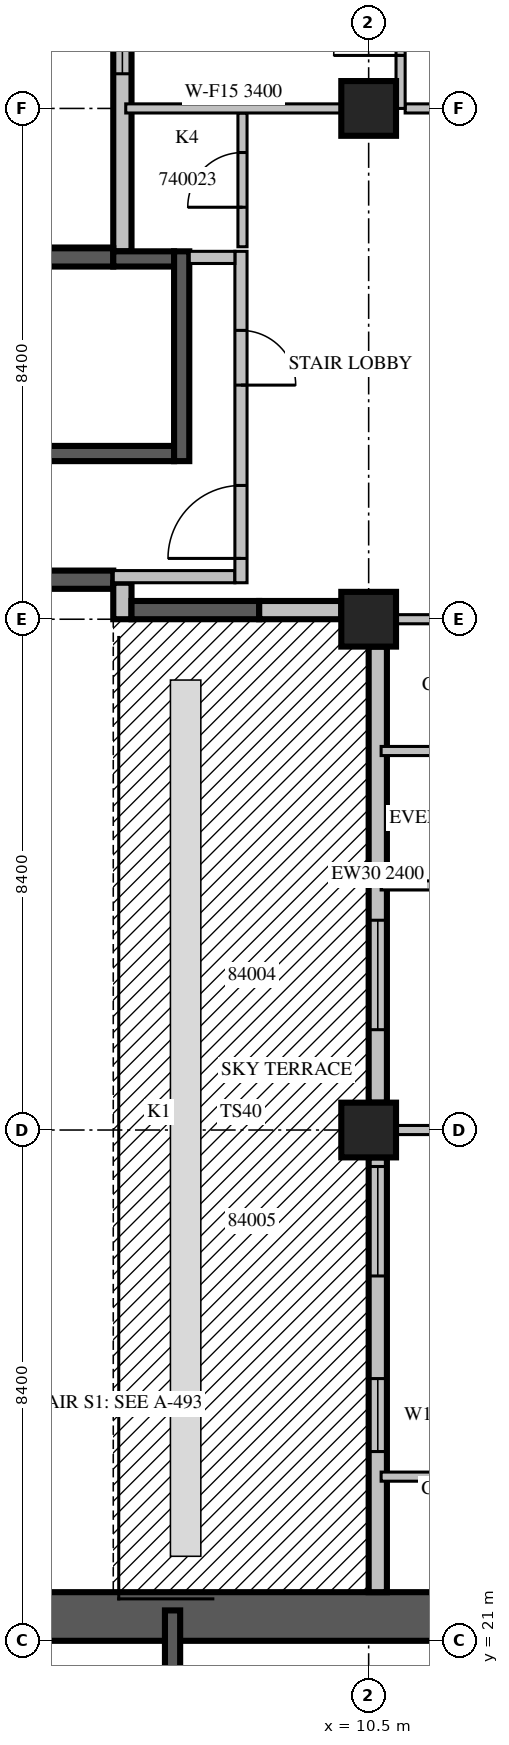
"""IFC4 building model, lengths in metres.
Left out: names, types, materials, properties, quantities, classifications, styles, units other than length and angle.
Written with IfcOpenShell. Run it as: python <this file> out.ifc"""

import sys

from ifc_helpers import new_model, si_unit, direction, frame, frame_2d, origin, origin_2d, place, context, subcontext, project, spatial, rectangle, extrude, source, transform, mapped, element, fill, save


model = new_model("IFC4")
c1 = context("Model", 3, precision=1e-05, world=origin(), true_north=direction((0.0, 1.0)))
c2 = subcontext(c1, "Body", "Model", "MODEL_VIEW")
j1 = project(units=[si_unit("LENGTHUNIT", "METRE"), si_unit("PLANEANGLEUNIT", "RADIAN")], contexts=[c1])
p1 = place(None, origin())
s1 = spatial("IfcSite", under=j1, at=p1, CompositionType="ELEMENT")
p2 = place(p1, origin())
s2 = spatial("IfcBuilding", under=s1, at=p2, CompositionType="ELEMENT")
p3 = place(p2, frame((0.0, 0.0, 185.4)))
s3 = spatial("IfcBuildingStorey", under=s2, at=p3, CompositionType="ELEMENT", Elevation=185.4)
m1 = source(origin(), c2, "Body", "SweptSolid", [
    extrude(rectangle(XDim=0.9, YDim=0.9, at=origin_2d()), origin(), (0.0, 0.0, 1.0), 3.8),
])
for number, where, z_axis, x_axis in (
    (1, (10.5, 29.4, 0.0), (0.0, 0.0, 1.0), (1.0, 0.0, 0.0)),
    (2, (10.5, 37.8, 0.0), (0.0, 0.0, 1.0), (1.0, 0.0, 0.0)),
    (3, (10.5, 46.2, 0.0), (0.0, 0.0, 1.0), (1.0, 0.0, 0.0)),
):
    element("IfcColumn", number, at=place(p3, frame(where, z_axis=z_axis, x_axis=x_axis)), inside=s3, PredefinedType="COLUMN", context=c2, shape_type="MappedRepresentation", body=[
        mapped(m1, transform((0.0, 0.0, 0.0), scale=1.0)),
    ])
m2 = source(origin(), c2, "Body", "SweptSolid", [
    extrude(rectangle(XDim=16.8, YDim=0.8, at=frame_2d((8.4, 0.0))), origin(), (0.0, 0.0, 1.0), 3.8),
])
p4 = place(p3, frame((4.2, 21.4, 0.0), z_axis=(0.0, 0.0, 1.0), x_axis=(1.0, 0.0, 0.0)))
e4 = element("IfcWall", 4, at=p4, inside=s3, PredefinedType="SHEAR", context=c2, shape_type="MappedRepresentation", body=[
    mapped(m2, transform((0.0, 0.0, 0.0), scale=1.0)),
])
m3 = source(origin(), c2, "Body", "SweptSolid", [
    extrude(rectangle(XDim=1.2, YDim=2.1, at=frame_2d((0.6, 1.05))), frame((0.0, 0.41, 0.0), z_axis=(0.0, -1.0, 0.0), x_axis=(1.0, 0.0, 0.0)), (0.0, 0.0, 1.0), 0.82),
])
p5 = place(p4, frame((7.4, 0.0, 0.0)))
e5 = element("IfcOpeningElement", 5, at=p5, cuts=e4, PredefinedType="OPENING", context=c2, shape_type="MappedRepresentation", body=[
    mapped(m3, transform((0.0, 0.0, 0.0), scale=1.0)),
])
m4 = source(origin(), c2, "Body", "SweptSolid", [
    extrude(rectangle(XDim=9.91, YDim=0.3, at=frame_2d((4.955, 0.0))), origin(), (0.0, 0.0, 1.0), 3.4),
])
p6 = place(p3, frame((6.45, 53.76, 0.0), z_axis=(0.0, 0.0, 1.0), x_axis=(0.0, -1.0, 0.0)))
e6 = element("IfcWall", 6, at=p6, inside=s3, PredefinedType="STANDARD", context=c2, shape_type="MappedRepresentation", body=[
    mapped(m4, transform((0.0, 0.0, 0.0), scale=1.0)),
])
m5 = source(origin(), c2, "Body", "SweptSolid", [
    extrude(rectangle(XDim=3.6, YDim=2.3, at=frame_2d((1.8, 1.15))), frame((0.0, 0.16, 0.0), z_axis=(0.0, -1.0, 0.0), x_axis=(1.0, 0.0, 0.0)), (0.0, 0.0, 1.0), 0.32),
])
p7 = place(p6, frame((3.39, 0.0, 0.6)))
e7 = element("IfcOpeningElement", 7, at=p7, cuts=e6, PredefinedType="OPENING", context=c2, shape_type="MappedRepresentation", body=[
    mapped(m5, transform((0.0, 0.0, 0.0), scale=1.0)),
])
m6 = source(origin(), c2, "Body", "SweptSolid", [
    extrude(rectangle(XDim=2.4, YDim=2.3, at=frame_2d((1.2, 1.15))), frame((0.0, 0.16, 0.0), z_axis=(0.0, -1.0, 0.0), x_axis=(1.0, 0.0, 0.0)), (0.0, 0.0, 1.0), 0.32),
])
p8 = place(p6, frame((0.495, 0.0, 0.6)))
e8 = element("IfcOpeningElement", 8, at=p8, cuts=e6, PredefinedType="OPENING", context=c2, shape_type="MappedRepresentation", body=[
    mapped(m6, transform((0.0, 0.0, 0.0), scale=1.0)),
])
m7 = source(origin(), c2, "Body", "SweptSolid", [
    extrude(rectangle(XDim=6.1, YDim=0.3, at=frame_2d((3.05, 0.0))), origin(), (0.0, 0.0, 1.0), 3.4),
])
for number, where, z_axis, x_axis in (
    (9, (6.3, 43.75, 0.0), (0.0, 0.0, 1.0), (-1.0, 0.0, 0.0)),
    (10, (0.2, 38.45, 0.0), (0.0, 0.0, 1.0), (1.0, 0.0, 0.0)),
):
    element("IfcWall", number, at=place(p3, frame(where, z_axis=z_axis, x_axis=x_axis)), inside=s3, PredefinedType="SOLIDWALL", context=c2, shape_type="MappedRepresentation", body=[
        mapped(m7, transform((0.0, 0.0, 0.0), scale=1.0)),
    ])
m8 = source(origin(), c2, "Body", "SweptSolid", [
    extrude(rectangle(XDim=0.6, YDim=0.3, at=frame_2d((0.3, 0.0))), origin(), (0.0, 0.0, 1.0), 3.4),
])
p9 = place(p3, frame((6.45, 38.4, 0.0), z_axis=(0.0, 0.0, 1.0), x_axis=(0.0, -1.0, 0.0)))
e11 = element("IfcWall", 11, at=p9, inside=s3, PredefinedType="STANDARD", context=c2, shape_type="MappedRepresentation", body=[
    mapped(m8, transform((0.0, 0.0, 0.0), scale=1.0)),
])
p10 = place(p3, frame((6.6, 37.95, 0.0), z_axis=(0.0, 0.0, 1.0), x_axis=(1.0, 0.0, 0.0)))
e12 = element("IfcWall", 12, at=p10, inside=s3, PredefinedType="SOLIDWALL", context=c2, shape_type="SweptSolid", body=[
    extrude(rectangle(XDim=2.1, YDim=0.3, at=frame_2d((1.05, 0.0))), origin(), (0.0, 0.0, 1.0), 3.4),
])
p11 = place(p3, frame((8.7, 37.95, 0.0), z_axis=(0.0, 0.0, 1.0), x_axis=(1.0, 0.0, 0.0)))
e13 = element("IfcWall", 13, at=p11, inside=s3, PredefinedType="STANDARD", context=c2, shape_type="SweptSolid", body=[
    extrude(rectangle(XDim=1.35, YDim=0.3, at=frame_2d((0.675, 0.0))), origin(), (0.0, 0.0, 1.0), 3.4),
])
p12 = place(p3, frame((10.65, 37.35, 0.0), z_axis=(0.0, 0.0, 1.0), x_axis=(0.0, -1.0, 0.0)))
e14 = element("IfcWall", 14, at=p12, inside=s3, PredefinedType="STANDARD", context=c2, shape_type="SweptSolid", body=[
    extrude(rectangle(XDim=7.5, YDim=0.3, at=frame_2d((3.75, 0.0))), origin(), (0.0, 0.0, 1.0), 2.4),
])
m9 = source(origin(), c2, "Body", "SweptSolid", [
    extrude(rectangle(XDim=1.8, YDim=2.4, at=frame_2d((0.9, 1.2))), frame((0.0, 0.16, 0.0), z_axis=(0.0, -1.0, 0.0), x_axis=(1.0, 0.0, 0.0)), (0.0, 0.0, 1.0), 0.32),
])
p13 = place(p12, frame((4.5, 0.0, 0.0)))
e15 = element("IfcOpeningElement", 15, at=p13, cuts=e14, PredefinedType="OPENING", context=c2, shape_type="MappedRepresentation", body=[
    mapped(m9, transform((0.0, 0.0, 0.0), scale=1.0)),
])
m10 = source(origin(), c2, "Body", "SweptSolid", [
    extrude(rectangle(XDim=7.15, YDim=0.3, at=frame_2d((3.575, 0.0))), origin(), (0.0, 0.0, 1.0), 3.4),
])
p14 = place(p3, frame((10.65, 28.95, 0.0), z_axis=(0.0, 0.0, 1.0), x_axis=(0.0, -1.0, 0.0)))
e16 = element("IfcWall", 16, at=p14, inside=s3, PredefinedType="STANDARD", context=c2, shape_type="MappedRepresentation", body=[
    mapped(m10, transform((0.0, 0.0, 0.0), scale=1.0)),
])
p15 = place(p14, frame((0.15, 0.0, 0.0)))
e17 = element("IfcOpeningElement", 17, at=p15, cuts=e16, PredefinedType="OPENING", context=c2, shape_type="MappedRepresentation", body=[
    mapped(m9, transform((0.0, 0.0, 0.0), scale=1.0)),
])
m11 = source(origin(), c2, "Body", "SweptSolid", [
    extrude(rectangle(XDim=1.2, YDim=2.3, at=frame_2d((0.6, 1.15))), frame((0.0, 0.16, 0.0), z_axis=(0.0, -1.0, 0.0), x_axis=(1.0, 0.0, 0.0)), (0.0, 0.0, 1.0), 0.32),
])
p16 = place(p14, frame((3.638, 0.0, 0.6)))
e18 = element("IfcOpeningElement", 18, at=p16, cuts=e16, PredefinedType="OPENING", context=c2, shape_type="MappedRepresentation", body=[
    mapped(m11, transform((0.0, 0.0, 0.0), scale=1.0)),
])
m12 = source(origin(), c2, "Body", "SweptSolid", [
    extrude(rectangle(XDim=6.6, YDim=0.25, at=frame_2d((3.3, 0.0))), origin(), (0.0, 0.0, 1.0), 3.4),
])
p17 = place(p3, frame((7.275, 14.9, 0.0), z_axis=(0.0, 0.0, 1.0), x_axis=(0.0, 1.0, 0.0)))
e19 = element("IfcWall", 19, at=p17, inside=s3, PredefinedType="SOLIDWALL", context=c2, shape_type="MappedRepresentation", body=[
    mapped(m12, transform((0.0, 0.0, 0.0), scale=1.0)),
])
m13 = source(origin(), c2, "Body", "SweptSolid", [
    extrude(rectangle(XDim=1.1, YDim=2.1, at=frame_2d((0.55, 1.05))), frame((0.0, 0.135, 0.0), z_axis=(0.0, -1.0, 0.0), x_axis=(1.0, 0.0, 0.0)), (0.0, 0.0, 1.0), 0.27),
])
p18 = place(p17, frame((0.15, 0.0, 0.0)))
e20 = element("IfcOpeningElement", 20, at=p18, cuts=e19, PredefinedType="OPENING", context=c2, shape_type="MappedRepresentation", body=[
    mapped(m13, transform((0.0, 0.0, 0.0), scale=1.0)),
])
m14 = source(origin(), c2, "Body", "SweptSolid", [
    extrude(rectangle(XDim=7.0, YDim=0.25, at=frame_2d((3.5, 0.0))), origin(), (0.0, 0.0, 1.0), 3.4),
])
p19 = place(p3, frame((0.3, 40.525, 0.0), z_axis=(0.0, 0.0, 1.0), x_axis=(1.0, 0.0, 0.0)))
e21 = element("IfcWall", 21, at=p19, inside=s3, PredefinedType="SOLIDWALL", context=c2, shape_type="MappedRepresentation", body=[
    mapped(m14, transform((0.0, 0.0, 0.0), scale=1.0)),
])
p20 = place(p19, frame((0.55, 0.0, 0.0)))
e22 = element("IfcOpeningElement", 22, at=p20, cuts=e21, PredefinedType="OPENING", context=c2, shape_type="MappedRepresentation", body=[
    mapped(m13, transform((0.0, 0.0, 0.0), scale=1.0)),
])
m15 = source(origin(), c2, "Body", "SweptSolid", [
    extrude(rectangle(XDim=1.0, YDim=0.25, at=frame_2d((0.5, 0.0))), origin(), (0.0, 0.0, 1.0), 3.4),
])
p21 = place(p3, frame((6.3, 43.725, 0.0), z_axis=(0.0, 0.0, 1.0), x_axis=(1.0, 0.0, 0.0)))
e23 = element("IfcWall", 23, at=p21, inside=s3, PredefinedType="SOLIDWALL", context=c2, shape_type="MappedRepresentation", body=[
    mapped(m15, transform((0.0, 0.0, 0.0), scale=1.0)),
])
m16 = source(origin(), c2, "Body", "SweptSolid", [
    extrude(rectangle(XDim=3.45, YDim=0.25, at=frame_2d((1.725, 0.0))), origin(), (0.0, 0.0, 1.0), 3.4),
])
p22 = place(p3, frame((7.425, 40.4, 0.0), z_axis=(0.0, 0.0, 1.0), x_axis=(0.0, 1.0, 0.0)))
e24 = element("IfcWall", 24, at=p22, inside=s3, PredefinedType="SOLIDWALL", context=c2, shape_type="MappedRepresentation", body=[
    mapped(m16, transform((0.0, 0.0, 0.0), scale=1.0)),
])
m17 = source(origin(), c2, "Body", "SweptSolid", [
    extrude(rectangle(XDim=2.0, YDim=0.2, at=frame_2d((1.0, 0.0))), origin(), (0.0, 0.0, 1.0), 3.4),
])
p23 = place(p3, frame((6.3, 38.5, 0.0), z_axis=(0.0, 0.0, 1.0), x_axis=(1.0, 0.0, 0.0)))
e25 = element("IfcWall", 25, at=p23, inside=s3, PredefinedType="PARTITIONING", context=c2, shape_type="MappedRepresentation", body=[
    mapped(m17, transform((0.0, 0.0, 0.0), scale=1.0)),
])
m18 = source(origin(), c2, "Body", "SweptSolid", [
    extrude(rectangle(XDim=5.45, YDim=0.2, at=frame_2d((2.725, 0.0))), origin(), (0.0, 0.0, 1.0), 3.4),
])
p24 = place(p3, frame((8.4, 38.4, 0.0), z_axis=(0.0, 0.0, 1.0), x_axis=(0.0, 1.0, 0.0)))
e26 = element("IfcWall", 26, at=p24, inside=s3, PredefinedType="PARTITIONING", context=c2, shape_type="MappedRepresentation", body=[
    mapped(m18, transform((0.0, 0.0, 0.0), scale=1.0)),
])
m19 = source(origin(), c2, "Body", "SweptSolid", [
    extrude(rectangle(XDim=1.2, YDim=2.1, at=frame_2d((0.6, 1.05))), frame((0.0, 0.11, 0.0), z_axis=(0.0, -1.0, 0.0), x_axis=(1.0, 0.0, 0.0)), (0.0, 0.0, 1.0), 0.22),
])
p25 = place(p24, frame((0.4, 0.0, 0.0)))
e27 = element("IfcOpeningElement", 27, at=p25, cuts=e26, PredefinedType="OPENING", context=c2, shape_type="MappedRepresentation", body=[
    mapped(m19, transform((0.0, 0.0, 0.0), scale=1.0)),
])
m20 = source(origin(), c2, "Body", "SweptSolid", [
    extrude(rectangle(XDim=0.9, YDim=2.1, at=frame_2d((0.45, 1.05))), frame((0.0, 0.11, 0.0), z_axis=(0.0, -1.0, 0.0), x_axis=(1.0, 0.0, 0.0)), (0.0, 0.0, 1.0), 0.22),
])
p26 = place(p24, frame((3.25, 0.0, 0.0)))
e28 = element("IfcOpeningElement", 28, at=p26, cuts=e26, PredefinedType="OPENING", context=c2, shape_type="MappedRepresentation", body=[
    mapped(m20, transform((0.0, 0.0, 0.0), scale=1.0)),
])
m21 = source(origin(), c2, "Body", "SweptSolid", [
    extrude(rectangle(XDim=0.75, YDim=0.2, at=frame_2d((0.375, 0.0))), origin(), (0.0, 0.0, 1.0), 3.4),
])
p27 = place(p3, frame((7.55, 43.75, 0.0), z_axis=(0.0, 0.0, 1.0), x_axis=(1.0, 0.0, 0.0)))
e29 = element("IfcWall", 29, at=p27, inside=s3, PredefinedType="PARTITIONING", context=c2, shape_type="MappedRepresentation", body=[
    mapped(m21, transform((0.0, 0.0, 0.0), scale=1.0)),
])
p28 = place(p3, frame((10.705, 23.7, 0.0), z_axis=(0.0, 0.0, 1.0), x_axis=(1.0, 0.0, 0.0)))
e30 = element("IfcWall", 30, at=p28, inside=s3, PredefinedType="PARTITIONING", context=c2, shape_type="SweptSolid", body=[
    extrude(rectangle(XDim=4.295, YDim=0.15, at=frame_2d((2.147, 0.0))), origin(), (0.0, 0.0, 1.0), 3.4),
])
m22 = source(origin(), c2, "Body", "SweptSolid", [
    extrude(rectangle(XDim=0.9, YDim=2.1, at=frame_2d((0.45, 1.05))), frame((0.0, 0.085, 0.0), z_axis=(0.0, -1.0, 0.0), x_axis=(1.0, 0.0, 0.0)), (0.0, 0.0, 1.0), 0.17),
])
p29 = place(p28, frame((2.283, 0.0, 0.0)))
e31 = element("IfcOpeningElement", 31, at=p29, cuts=e30, PredefinedType="OPENING", context=c2, shape_type="MappedRepresentation", body=[
    mapped(m22, transform((0.0, 0.0, 0.0), scale=1.0)),
])
m23 = source(origin(), c2, "Body", "SweptSolid", [
    extrude(rectangle(XDim=4.051, YDim=0.15, at=frame_2d((2.026, 0.0))), origin(), (0.0, 0.0, 1.0), 3.4),
])
p30 = place(p3, frame((15.0, 29.4, 0.0), z_axis=(0.0, 0.0, 1.0), x_axis=(-1.0, 0.0, 0.0)))
e32 = element("IfcWall", 32, at=p30, inside=s3, PredefinedType="PARTITIONING", context=c2, shape_type="MappedRepresentation", body=[
    mapped(m23, transform((0.0, 0.0, 0.0), scale=1.0)),
])
m24 = source(origin(), c2, "Body", "SweptSolid", [
    extrude(rectangle(XDim=2.2, YDim=0.15, at=frame_2d((1.1, 0.0))), origin(), (0.0, 0.0, 1.0), 3.4),
])
p31 = place(p3, frame((8.425, 43.925, 0.0), z_axis=(0.0, 0.0, 1.0), x_axis=(0.0, 1.0, 0.0)))
e33 = element("IfcWall", 33, at=p31, inside=s3, PredefinedType="PARTITIONING", context=c2, shape_type="MappedRepresentation", body=[
    mapped(m24, transform((0.0, 0.0, 0.0), scale=1.0)),
])
p32 = place(p31, frame((0.65, 0.0, 0.0)))
e34 = element("IfcOpeningElement", 34, at=p32, cuts=e33, PredefinedType="OPENING", context=c2, shape_type="MappedRepresentation", body=[
    mapped(m22, transform((0.0, 0.0, 0.0), scale=1.0)),
])
m25 = source(origin(), c2, "Body", "SweptSolid", [
    extrude(rectangle(XDim=4.295, YDim=0.15, at=frame_2d((2.147, 0.0))), origin(), (0.0, 0.0, 1.0), 3.4),
])
p33 = place(p3, frame((15.0, 33.422, 0.0), z_axis=(0.0, 0.0, 1.0), x_axis=(-1.0, 0.0, 0.0)))
e35 = element("IfcWall", 35, at=p33, inside=s3, PredefinedType="PARTITIONING", context=c2, shape_type="MappedRepresentation", body=[
    mapped(m25, transform((0.0, 0.0, 0.0), scale=1.0)),
])
p34 = place(p3, frame((15.0, 35.633, 0.0), z_axis=(0.0, 0.0, 1.0), x_axis=(-1.0, 0.0, 0.0)))
e36 = element("IfcWall", 36, at=p34, inside=s3, PredefinedType="PARTITIONING", context=c2, shape_type="MappedRepresentation", body=[
    mapped(m25, transform((0.0, 0.0, 0.0), scale=1.0)),
])
p35 = place(p34, frame((1.698, 0.0, 0.0)))
e37 = element("IfcOpeningElement", 37, at=p35, cuts=e36, PredefinedType="OPENING", context=c2, shape_type="MappedRepresentation", body=[
    mapped(m22, transform((0.0, 0.0, 0.0), scale=1.0)),
])
p36 = place(p3, frame((15.0, 37.8, 0.0), z_axis=(0.0, 0.0, 1.0), x_axis=(-1.0, 0.0, 0.0)))
e38 = element("IfcWall", 38, at=p36, inside=s3, PredefinedType="PARTITIONING", context=c2, shape_type="MappedRepresentation", body=[
    mapped(m23, transform((0.0, 0.0, 0.0), scale=1.0)),
])
m26 = source(origin(), c2, "Body", "SweptSolid", [
    extrude(rectangle(XDim=3.546, YDim=0.15, at=frame_2d((1.773, 0.0))), origin(), (0.0, 0.0, 1.0), 3.4),
])
p37 = place(p3, frame((10.051, 46.2, 0.0), z_axis=(0.0, 0.0, 1.0), x_axis=(-1.0, 0.0, 0.0)))
e39 = element("IfcWall", 39, at=p37, inside=s3, PredefinedType="PARTITIONING", context=c2, shape_type="MappedRepresentation", body=[
    mapped(m26, transform((0.0, 0.0, 0.0), scale=1.0)),
])
m27 = source(origin(), c2, "Body", "SweptSolid", [
    extrude(rectangle(XDim=3.9, YDim=0.15, at=frame_2d((1.95, 0.0))), origin(), (0.0, 0.0, 1.0), 3.4),
])
p38 = place(p3, frame((15.0, 46.2, 0.0), z_axis=(0.0, 0.0, 1.0), x_axis=(-1.0, 0.0, 0.0)))
e40 = element("IfcWall", 40, at=p38, inside=s3, PredefinedType="PARTITIONING", context=c2, shape_type="MappedRepresentation", body=[
    mapped(m27, transform((0.0, 0.0, 0.0), scale=1.0)),
])
m28 = source(origin(), c2, "Body", "SweptSolid", [
    extrude(rectangle(XDim=7.26, YDim=0.15, at=frame_2d((3.63, 0.0))), origin(), (0.0, 0.0, 1.0), 3.4),
])
p39 = place(p3, frame((11.025, 46.2, 0.0), z_axis=(0.0, 0.0, 1.0), x_axis=(0.0, 1.0, 0.0)))
e41 = element("IfcWall", 41, at=p39, inside=s3, PredefinedType="PARTITIONING", context=c2, shape_type="MappedRepresentation", body=[
    mapped(m28, transform((0.0, 0.0, 0.0), scale=1.0)),
])
m29 = source(origin(), c2, "Body", "SweptSolid", [
    extrude(rectangle(XDim=1.1, YDim=2.1, at=frame_2d((0.55, 1.05))), frame((0.0, 0.085, 0.0), z_axis=(0.0, -1.0, 0.0), x_axis=(1.0, 0.0, 0.0)), (0.0, 0.0, 1.0), 0.17),
])
p40 = place(p39, frame((0.872, 0.0, 0.0)))
e42 = element("IfcOpeningElement", 42, at=p40, cuts=e41, PredefinedType="OPENING", context=c2, shape_type="MappedRepresentation", body=[
    mapped(m29, transform((0.0, 0.0, 0.0), scale=1.0)),
])
p41 = place(p39, frame((2.92, 0.0, 0.0)))
e43 = element("IfcOpeningElement", 43, at=p41, cuts=e41, PredefinedType="OPENING", context=c2, shape_type="MappedRepresentation", body=[
    mapped(m22, transform((0.0, 0.0, 0.0), scale=1.0)),
])
p42 = place(p39, frame((4.478, 0.0, 0.0)))
e44 = element("IfcOpeningElement", 44, at=p42, cuts=e41, PredefinedType="OPENING", context=c2, shape_type="MappedRepresentation", body=[
    mapped(m22, transform((0.0, 0.0, 0.0), scale=1.0)),
])
m30 = source(origin(), c2, "Body", "SweptSolid", [
    extrude(rectangle(XDim=3.6, YDim=2.3, at=frame_2d((1.8, 1.15))), frame((0.0, 0.03, 0.0), z_axis=(0.0, -1.0, 0.0), x_axis=(1.0, 0.0, 0.0)), (0.0, 0.0, 1.0), 0.06),
])
p43 = place(p7, origin())
e45 = element("IfcWindow", 45, at=p43, inside=s3, PartitioningType="SINGLE_PANEL", PredefinedType="WINDOW", context=c2, shape_type="MappedRepresentation", body=[
    mapped(m30, transform((0.0, 0.0, 0.0), scale=1.0)),
])
fill(e7, e45)
m31 = source(origin(), c2, "Body", "SweptSolid", [
    extrude(rectangle(XDim=1.8, YDim=2.4, at=frame_2d((0.9, 1.2))), frame((0.0, 0.025, 0.0), z_axis=(0.0, -1.0, 0.0), x_axis=(1.0, 0.0, 0.0)), (0.0, 0.0, 1.0), 0.05),
])
p44 = place(p13, origin())
e46 = element("IfcDoor", 46, at=p44, inside=s3, OperationType="SLIDING_TO_LEFT", PredefinedType="DOOR", context=c2, shape_type="MappedRepresentation", body=[
    mapped(m31, transform((0.0, 0.0, 0.0), scale=1.0)),
])
fill(e15, e46)
p45 = place(p15, origin())
e47 = element("IfcDoor", 47, at=p45, inside=s3, OperationType="SLIDING_TO_LEFT", PredefinedType="DOOR", context=c2, shape_type="MappedRepresentation", body=[
    mapped(m31, transform((0.0, 0.0, 0.0), scale=1.0)),
])
fill(e17, e47)
m32 = source(origin(), c2, "Body", "SweptSolid", [
    extrude(rectangle(XDim=1.2, YDim=2.3, at=frame_2d((0.6, 1.15))), frame((0.0, 0.03, 0.0), z_axis=(0.0, -1.0, 0.0), x_axis=(1.0, 0.0, 0.0)), (0.0, 0.0, 1.0), 0.06),
])
p46 = place(p16, origin())
e48 = element("IfcWindow", 48, at=p46, inside=s3, PartitioningType="SINGLE_PANEL", PredefinedType="WINDOW", context=c2, shape_type="MappedRepresentation", body=[
    mapped(m32, transform((0.0, 0.0, 0.0), scale=1.0)),
])
fill(e18, e48)
m33 = source(origin(), c2, "Body", "SweptSolid", [
    extrude(rectangle(XDim=1.2, YDim=2.1, at=frame_2d((0.6, 1.05))), frame((0.0, 0.025, 0.0), z_axis=(0.0, -1.0, 0.0), x_axis=(1.0, 0.0, 0.0)), (0.0, 0.0, 1.0), 0.05),
])
p47 = place(p25, origin())
e49 = element("IfcDoor", 49, at=p47, inside=s3, OperationType="SINGLE_SWING_LEFT", PredefinedType="DOOR", context=c2, shape_type="MappedRepresentation", body=[
    mapped(m33, transform((0.0, 0.0, 0.0), scale=1.0)),
])
fill(e27, e49)
m34 = source(origin(), c2, "Body", "SweptSolid", [
    extrude(rectangle(XDim=0.9, YDim=2.1, at=frame_2d((0.45, 1.05))), frame((0.0, 0.025, 0.0), z_axis=(0.0, -1.0, 0.0), x_axis=(1.0, 0.0, 0.0)), (0.0, 0.0, 1.0), 0.05),
])
p48 = place(p26, origin())
e50 = element("IfcDoor", 50, at=p48, inside=s3, OperationType="SINGLE_SWING_RIGHT", PredefinedType="DOOR", context=c2, shape_type="MappedRepresentation", body=[
    mapped(m34, transform((0.0, 0.0, 0.0), scale=1.0)),
])
fill(e28, e50)
p49 = place(p32, origin())
e51 = element("IfcDoor", 51, at=p49, inside=s3, OperationType="SINGLE_SWING_LEFT", PredefinedType="DOOR", context=c2, shape_type="MappedRepresentation", body=[
    mapped(m34, transform((0.0, 0.0, 0.0), scale=1.0)),
])
fill(e34, e51)
m35 = source(origin(), c2, "Body", "SweptSolid", [
    extrude(rectangle(XDim=1.1, YDim=2.1, at=frame_2d((0.55, 1.05))), frame((0.0, 0.025, 0.0), z_axis=(0.0, -1.0, 0.0), x_axis=(1.0, 0.0, 0.0)), (0.0, 0.0, 1.0), 0.05),
])
p50 = place(p40, origin())
e52 = element("IfcDoor", 52, at=p50, inside=s3, OperationType="SINGLE_SWING_LEFT", PredefinedType="DOOR", context=c2, shape_type="MappedRepresentation", body=[
    mapped(m35, transform((0.0, 0.0, 0.0), scale=1.0)),
])
fill(e42, e52)
save(model, sys.argv[1])
